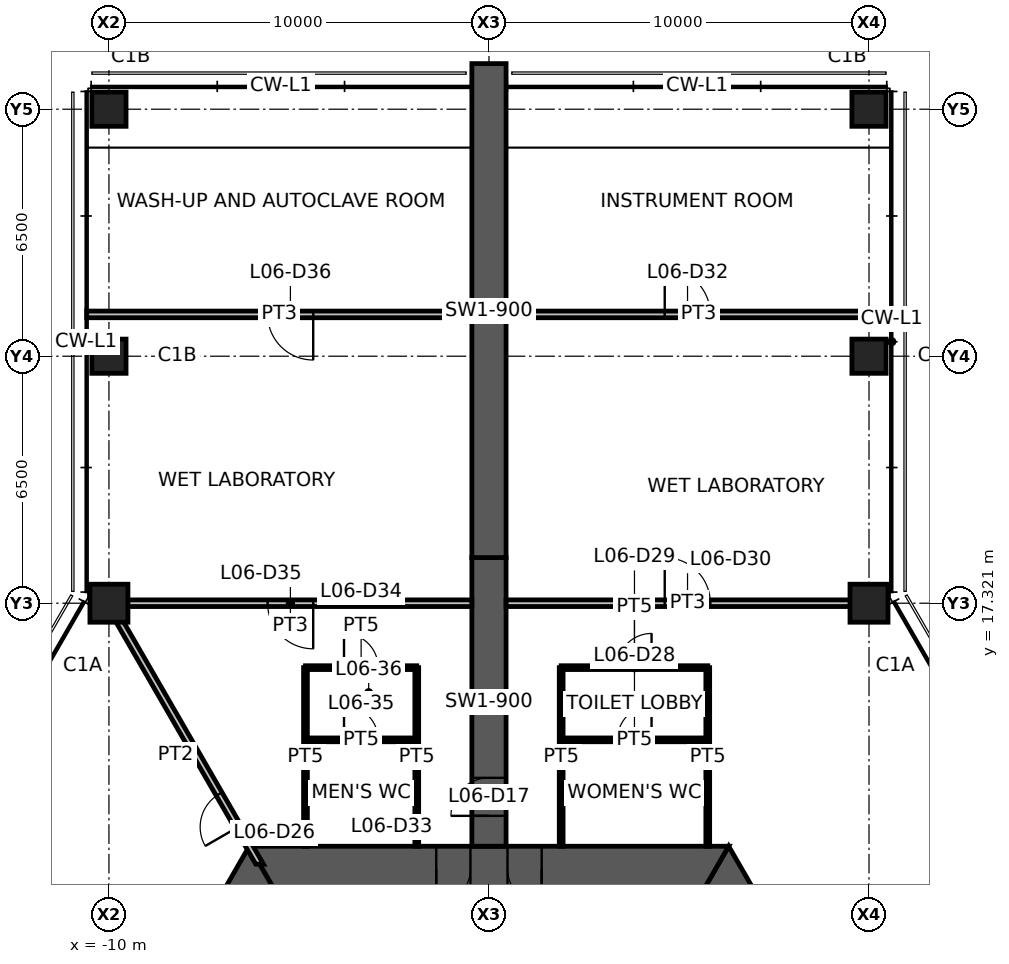
"""IFC4 building model, lengths in metres.
Left out: names, types, materials, properties, quantities, classifications, styles, units other than length and angle.
Written with IfcOpenShell. Run it as: python <this file> out.ifc"""

import sys

from ifc_helpers import new_model, si_unit, direction, frame, frame_2d, origin, origin_2d, place, context, subcontext, project, spatial, polyline, rectangle, hollow_rectangle, outline, extrude, element, fill, save


model = new_model("IFC4")
c1 = context("Model", 3, precision=1e-05, world=origin(), true_north=direction((0.0, 1.0)))
c2 = subcontext(c1, "Body", "Model", "MODEL_VIEW")
j1 = project(units=[si_unit("LENGTHUNIT", "METRE"), si_unit("PLANEANGLEUNIT", "RADIAN")], contexts=[c1])
p1 = place(None, origin())
s1 = spatial("IfcSite", under=j1, at=p1, CompositionType="ELEMENT")
p2 = place(p1, origin())
s2 = spatial("IfcBuilding", under=s1, at=p2, CompositionType="ELEMENT")
p3 = place(p2, frame((0.0, 0.0, 22.6)))
s3 = spatial("IfcBuildingStorey", under=s2, at=p3, CompositionType="ELEMENT", Elevation=22.6)
for number, where, z_axis, x_axis in (
    (1, (10.0, 17.321, 0.0), (0.0, 0.0, 1.0), (1.0, 0.0, 0.0)),
    (2, (-10.0, 17.321, 0.0), (0.0, 0.0, 1.0), (1.0, 0.0, 0.0)),
):
    element("IfcColumn", number, at=place(p3, frame(where, z_axis=z_axis, x_axis=x_axis)), inside=s3, PredefinedType="COLUMN", context=c2, shape_type="SweptSolid", body=[
        extrude(hollow_rectangle(XDim=1.0, YDim=1.0, WallThickness=0.06, at=origin_2d()), origin(), (0.0, 0.0, 1.0), 4.2),
    ])
for number, where, z_axis, x_axis in (
    (3, (10.0, 23.821, 0.0), (0.0, 0.0, 1.0), (1.0, 0.0, 0.0)),
    (4, (10.0, 30.321, 0.0), (0.0, 0.0, 1.0), (1.0, 0.0, 0.0)),
    (5, (-10.0, 23.821, 0.0), (0.0, 0.0, 1.0), (1.0, 0.0, 0.0)),
    (6, (-10.0, 30.321, 0.0), (0.0, 0.0, 1.0), (1.0, 0.0, 0.0)),
):
    element("IfcColumn", number, at=place(p3, frame(where, z_axis=z_axis, x_axis=x_axis)), inside=s3, PredefinedType="COLUMN", context=c2, shape_type="SweptSolid", body=[
        extrude(hollow_rectangle(XDim=0.9, YDim=0.9, WallThickness=0.05, at=origin_2d()), origin(), (0.0, 0.0, 1.0), 4.2),
    ])
p4 = place(p3, frame((11.922, 0.0, 0.0), z_axis=(0.0, 0.0, 1.0), x_axis=(-0.500004296715, 0.866022923061, 0.0)))
e7 = element("IfcWall", 7, at=p4, inside=s3, PredefinedType="SHEAR", context=c2, shape_type="SweptSolid", body=[
    extrude(outline(polyline([(-0.346, -0.6), (5.835, -0.6), (6.635, -0.6), (12.269, -0.6), (11.576, 0.6), (6.635, 0.6), (5.835, 0.6), (0.346, 0.6), (-0.346, -0.6)])), origin(), (0.0, 0.0, 1.0), 4.2),
])
p5 = place(p4, frame((5.835, 0.0, 0.0)))
e8 = element("IfcOpeningElement", 8, at=p5, cuts=e7, PredefinedType="OPENING", context=c2, shape_type="SweptSolid", body=[
    extrude(rectangle(XDim=0.8, YDim=2.1, at=frame_2d((0.4, 1.05))), frame((0.0, 0.61, 0.0), z_axis=(0.0, -1.0, 0.0), x_axis=(1.0, 0.0, 0.0)), (0.0, 0.0, 1.0), 1.22),
])
p6 = place(p3, frame((5.961, 10.325, 0.0), z_axis=(0.0, 0.0, 1.0), x_axis=(-1.0, 0.0, 0.0)))
e9 = element("IfcWall", 9, at=p6, inside=s3, PredefinedType="SHEAR", context=c2, shape_type="SweptSolid", body=[
    extrude(outline(polyline([(-0.346, -0.6), (4.574, -0.6), (5.474, -0.6), (6.449, -0.6), (7.349, -0.6), (12.269, -0.6), (11.576, 0.6), (7.349, 0.6), (6.449, 0.6), (5.474, 0.6), (4.574, 0.6), (0.346, 0.6), (-0.346, -0.6)])), origin(), (0.0, 0.0, 1.0), 4.2),
])
p7 = place(p6, frame((6.449, 0.0, 0.0)))
e10 = element("IfcOpeningElement", 10, at=p7, cuts=e9, PredefinedType="OPENING", context=c2, shape_type="SweptSolid", body=[
    extrude(rectangle(XDim=0.9, YDim=2.1, at=frame_2d((0.45, 1.05))), frame((0.0, 0.61, 0.0), z_axis=(0.0, -1.0, 0.0), x_axis=(1.0, 0.0, 0.0)), (0.0, 0.0, 1.0), 1.22),
])
p8 = place(p6, frame((4.574, 0.0, 0.0)))
e11 = element("IfcOpeningElement", 11, at=p8, cuts=e9, PredefinedType="OPENING", context=c2, shape_type="SweptSolid", body=[
    extrude(rectangle(XDim=0.9, YDim=2.1, at=frame_2d((0.45, 1.05))), frame((0.0, 0.61, 0.0), z_axis=(0.0, -1.0, 0.0), x_axis=(1.0, 0.0, 0.0)), (0.0, 0.0, 1.0), 1.22),
])
p9 = place(p3, frame((-5.961, 10.325, 0.0), z_axis=(0.0, 0.0, 1.0), x_axis=(-0.500004296715, -0.866022923061, 0.0)))
e12 = element("IfcWall", 12, at=p9, inside=s3, PredefinedType="SHEAR", context=c2, shape_type="SweptSolid", body=[
    extrude(outline(polyline([(-0.346, -0.6), (4.494, -0.6), (5.494, -0.6), (12.269, -0.6), (11.576, 0.6), (5.494, 0.6), (4.494, 0.6), (0.346, 0.6), (-0.346, -0.6)])), origin(), (0.0, 0.0, 1.0), 4.2),
])
p10 = place(p9, frame((4.494, 0.0, 0.0)))
e13 = element("IfcOpeningElement", 13, at=p10, cuts=e12, PredefinedType="OPENING", context=c2, shape_type="SweptSolid", body=[
    extrude(rectangle(XDim=1.0, YDim=2.1, at=frame_2d((0.5, 1.05))), frame((0.0, 0.61, 0.0), z_axis=(0.0, -1.0, 0.0), x_axis=(1.0, 0.0, 0.0)), (0.0, 0.0, 1.0), 1.22),
])
p11 = place(p3, frame((0.0, 10.925, 0.0), z_axis=(0.0, 0.0, 1.0), x_axis=(0.0, 1.0, 0.0)))
e14 = element("IfcWall", 14, at=p11, inside=s3, PredefinedType="SHEAR", context=c2, shape_type="SweptSolid", body=[
    extrude(rectangle(XDim=7.595, YDim=0.9, at=frame_2d((3.798, 0.0))), origin(), (0.0, 0.0, 1.0), 4.2),
])
p12 = place(p11, frame((0.8, 0.0, 0.0)))
e15 = element("IfcOpeningElement", 15, at=p12, cuts=e14, PredefinedType="OPENING", context=c2, shape_type="SweptSolid", body=[
    extrude(rectangle(XDim=1.0, YDim=2.1, at=frame_2d((0.5, 1.05))), frame((0.0, 0.46, 0.0), z_axis=(0.0, -1.0, 0.0), x_axis=(1.0, 0.0, 0.0)), (0.0, 0.0, 1.0), 0.92),
])
p13 = place(p3, frame((0.0, 18.521, 0.0), z_axis=(0.0, 0.0, 1.0), x_axis=(0.0, 1.0, 0.0)))
e16 = element("IfcWall", 16, at=p13, inside=s3, PredefinedType="SHEAR", context=c2, shape_type="SweptSolid", body=[
    extrude(rectangle(XDim=13.0, YDim=0.9, at=frame_2d((6.5, 0.0))), origin(), (0.0, 0.0, 1.0), 4.2),
])
p14 = place(p3, frame((-6.035, 10.453, 0.0), z_axis=(0.0, 0.0, 1.0), x_axis=(-0.499993402427, 0.866029212861, 0.0)))
e17 = element("IfcWall", 17, at=p14, inside=s3, PredefinedType="PARTITIONING", context=c2, shape_type="SweptSolid", body=[
    extrude(outline(polyline([(-0.051, -0.087), (1.129, -0.087), (2.129, -0.087), (7.93, -0.087), (7.93, 0.087), (2.129, 0.087), (1.129, 0.087), (0.051, 0.087), (-0.051, -0.087)])), origin(), (0.0, 0.0, 1.0), 3.3),
])
p15 = place(p14, frame((1.129, 0.0, 0.0)))
e18 = element("IfcOpeningElement", 18, at=p15, cuts=e17, PredefinedType="OPENING", context=c2, shape_type="SweptSolid", body=[
    extrude(rectangle(XDim=1.0, YDim=2.1, at=frame_2d((0.5, 1.05))), frame((0.0, 0.098, 0.0), z_axis=(0.0, -1.0, 0.0), x_axis=(1.0, 0.0, 0.0)), (0.0, 0.0, 1.0), 0.195),
])
p16 = place(p3, frame((1.9, 13.725, 0.0), z_axis=(0.0, 0.0, 1.0), x_axis=(1.0, 0.0, 0.0)))
e19 = element("IfcWall", 19, at=p16, inside=s3, PredefinedType="PARTITIONING", context=c2, shape_type="SweptSolid", body=[
    extrude(rectangle(XDim=3.857, YDim=0.1, at=frame_2d((1.929, 0.0))), origin(), (0.0, 0.0, 1.0), 3.2),
])
p17 = place(p16, frame((1.479, 0.0, 0.0)))
e20 = element("IfcOpeningElement", 20, at=p17, cuts=e19, PredefinedType="OPENING", context=c2, shape_type="SweptSolid", body=[
    extrude(rectangle(XDim=0.9, YDim=2.1, at=frame_2d((0.45, 1.05))), frame((0.0, 0.06, 0.0), z_axis=(0.0, -1.0, 0.0), x_axis=(1.0, 0.0, 0.0)), (0.0, 0.0, 1.0), 0.12),
])
p18 = place(p3, frame((1.9, 15.625, 0.0), z_axis=(0.0, 0.0, 1.0), x_axis=(1.0, 0.0, 0.0)))
e21 = element("IfcWall", 21, at=p18, inside=s3, PredefinedType="PARTITIONING", context=c2, shape_type="SweptSolid", body=[
    extrude(rectangle(XDim=3.857, YDim=0.1, at=frame_2d((1.929, 0.0))), origin(), (0.0, 0.0, 1.0), 3.2),
])
p19 = place(p18, frame((1.479, 0.0, 0.0)))
e22 = element("IfcOpeningElement", 22, at=p19, cuts=e21, PredefinedType="OPENING", context=c2, shape_type="SweptSolid", body=[
    extrude(rectangle(XDim=0.9, YDim=2.1, at=frame_2d((0.45, 1.05))), frame((0.0, 0.06, 0.0), z_axis=(0.0, -1.0, 0.0), x_axis=(1.0, 0.0, 0.0)), (0.0, 0.0, 1.0), 0.12),
])
for number, where, z_axis, x_axis in (
    (23, (1.9, 10.925, 0.0), (0.0, 0.0, 1.0), (0.0, 1.0, 0.0)),
    (24, (5.757, 10.925, 0.0), (0.0, 0.0, 1.0), (0.0, 1.0, 0.0)),
):
    element("IfcWall", number, at=place(p3, frame(where, z_axis=z_axis, x_axis=x_axis)), inside=s3, PredefinedType="PARTITIONING", context=c2, shape_type="SweptSolid", body=[
        extrude(rectangle(XDim=4.7, YDim=0.1, at=frame_2d((2.35, 0.0))), origin(), (0.0, 0.0, 1.0), 3.2),
    ])
p20 = place(p3, frame((0.45, 17.321, 0.0), z_axis=(0.0, 0.0, 1.0), x_axis=(1.0, 0.0, 0.0)))
e25 = element("IfcWall", 25, at=p20, inside=s3, PredefinedType="PARTITIONING", context=c2, shape_type="SweptSolid", body=[
    extrude(rectangle(XDim=9.55, YDim=0.175, at=frame_2d((4.775, 0.0))), origin(), (0.0, 0.0, 1.0), 3.208),
])
p21 = place(p20, frame((4.175, 0.0, 0.0)))
e26 = element("IfcOpeningElement", 26, at=p21, cuts=e25, PredefinedType="OPENING", context=c2, shape_type="SweptSolid", body=[
    extrude(rectangle(XDim=1.2, YDim=2.1, at=frame_2d((0.6, 1.05))), frame((0.0, 0.098, 0.0), z_axis=(0.0, -1.0, 0.0), x_axis=(1.0, 0.0, 0.0)), (0.0, 0.0, 1.0), 0.195),
])
p22 = place(p3, frame((0.45, 24.92, 0.0), z_axis=(0.0, 0.0, 1.0), x_axis=(1.0, 0.0, 0.0)))
e27 = element("IfcWall", 27, at=p22, inside=s3, PredefinedType="PARTITIONING", context=c2, shape_type="SweptSolid", body=[
    extrude(rectangle(XDim=10.135, YDim=0.175, at=frame_2d((5.067, 0.0))), origin(), (0.0, 0.0, 1.0), 4.0),
])
p23 = place(p22, frame((4.175, 0.0, 0.0)))
e28 = element("IfcOpeningElement", 28, at=p23, cuts=e27, PredefinedType="OPENING", context=c2, shape_type="SweptSolid", body=[
    extrude(rectangle(XDim=1.2, YDim=2.1, at=frame_2d((0.6, 1.05))), frame((0.0, 0.098, 0.0), z_axis=(0.0, -1.0, 0.0), x_axis=(1.0, 0.0, 0.0)), (0.0, 0.0, 1.0), 0.195),
])
p24 = place(p3, frame((-4.829, 13.725, 0.0), z_axis=(0.0, 0.0, 1.0), x_axis=(1.0, 0.0, 0.0)))
e29 = element("IfcWall", 29, at=p24, inside=s3, PredefinedType="PARTITIONING", context=c2, shape_type="SweptSolid", body=[
    extrude(rectangle(XDim=2.929, YDim=0.1, at=frame_2d((1.464, 0.0))), origin(), (0.0, 0.0, 1.0), 3.2),
])
p25 = place(p24, frame((1.014, 0.0, 0.0)))
e30 = element("IfcOpeningElement", 30, at=p25, cuts=e29, PredefinedType="OPENING", context=c2, shape_type="SweptSolid", body=[
    extrude(rectangle(XDim=0.9, YDim=2.1, at=frame_2d((0.45, 1.05))), frame((0.0, 0.06, 0.0), z_axis=(0.0, -1.0, 0.0), x_axis=(1.0, 0.0, 0.0)), (0.0, 0.0, 1.0), 0.12),
])
p26 = place(p3, frame((-4.829, 15.625, 0.0), z_axis=(0.0, 0.0, 1.0), x_axis=(1.0, 0.0, 0.0)))
e31 = element("IfcWall", 31, at=p26, inside=s3, PredefinedType="PARTITIONING", context=c2, shape_type="SweptSolid", body=[
    extrude(rectangle(XDim=2.929, YDim=0.1, at=frame_2d((1.464, 0.0))), origin(), (0.0, 0.0, 1.0), 3.2),
])
p27 = place(p26, frame((1.014, 0.0, 0.0)))
e32 = element("IfcOpeningElement", 32, at=p27, cuts=e31, PredefinedType="OPENING", context=c2, shape_type="SweptSolid", body=[
    extrude(rectangle(XDim=0.9, YDim=2.1, at=frame_2d((0.45, 1.05))), frame((0.0, 0.06, 0.0), z_axis=(0.0, -1.0, 0.0), x_axis=(1.0, 0.0, 0.0)), (0.0, 0.0, 1.0), 0.12),
])
for number, where, z_axis, x_axis in (
    (33, (-1.9, 10.925, 0.0), (0.0, 0.0, 1.0), (0.0, 1.0, 0.0)),
    (34, (-4.829, 10.925, 0.0), (0.0, 0.0, 1.0), (0.0, 1.0, 0.0)),
):
    element("IfcWall", number, at=place(p3, frame(where, z_axis=z_axis, x_axis=x_axis)), inside=s3, PredefinedType="PARTITIONING", context=c2, shape_type="SweptSolid", body=[
        extrude(rectangle(XDim=4.7, YDim=0.1, at=frame_2d((2.35, 0.0))), origin(), (0.0, 0.0, 1.0), 3.2),
    ])
p28 = place(p3, frame((-0.45, 17.321, 0.0), z_axis=(0.0, 0.0, 1.0), x_axis=(-1.0, 0.0, 0.0)))
e35 = element("IfcWall", 35, at=p28, inside=s3, PredefinedType="PARTITIONING", context=c2, shape_type="SweptSolid", body=[
    extrude(rectangle(XDim=9.55, YDim=0.175, at=frame_2d((4.775, 0.0))), origin(), (0.0, 0.0, 1.0), 3.208),
])
p29 = place(p28, frame((4.175, 0.0, 0.0)))
e36 = element("IfcOpeningElement", 36, at=p29, cuts=e35, PredefinedType="OPENING", context=c2, shape_type="SweptSolid", body=[
    extrude(rectangle(XDim=1.2, YDim=2.1, at=frame_2d((0.6, 1.05))), frame((0.0, 0.098, 0.0), z_axis=(0.0, -1.0, 0.0), x_axis=(1.0, 0.0, 0.0)), (0.0, 0.0, 1.0), 0.195),
])
p30 = place(p3, frame((-0.45, 24.92, 0.0), z_axis=(0.0, 0.0, 1.0), x_axis=(-1.0, 0.0, 0.0)))
e37 = element("IfcWall", 37, at=p30, inside=s3, PredefinedType="PARTITIONING", context=c2, shape_type="SweptSolid", body=[
    extrude(rectangle(XDim=10.135, YDim=0.175, at=frame_2d((5.067, 0.0))), origin(), (0.0, 0.0, 1.0), 4.0),
])
p31 = place(p30, frame((4.175, 0.0, 0.0)))
e38 = element("IfcOpeningElement", 38, at=p31, cuts=e37, PredefinedType="OPENING", context=c2, shape_type="SweptSolid", body=[
    extrude(rectangle(XDim=1.2, YDim=2.1, at=frame_2d((0.6, 1.05))), frame((0.0, 0.098, 0.0), z_axis=(0.0, -1.0, 0.0), x_axis=(1.0, 0.0, 0.0)), (0.0, 0.0, 1.0), 0.195),
])
p32 = place(p7, origin())
e39 = element("IfcDoor", 39, at=p32, inside=s3, OperationType="SINGLE_SWING_RIGHT", PredefinedType="DOOR", context=c2, shape_type="SweptSolid", body=[
    extrude(rectangle(XDim=0.9, YDim=2.1, at=frame_2d((0.45, 1.05))), frame((0.0, 0.025, 0.0), z_axis=(0.0, -1.0, 0.0), x_axis=(1.0, 0.0, 0.0)), (0.0, 0.0, 1.0), 0.05),
])
fill(e10, e39)
p33 = place(p8, origin())
e40 = element("IfcDoor", 40, at=p33, inside=s3, OperationType="SINGLE_SWING_LEFT", PredefinedType="DOOR", context=c2, shape_type="SweptSolid", body=[
    extrude(rectangle(XDim=0.9, YDim=2.1, at=frame_2d((0.45, 1.05))), frame((0.0, 0.025, 0.0), z_axis=(0.0, -1.0, 0.0), x_axis=(1.0, 0.0, 0.0)), (0.0, 0.0, 1.0), 0.05),
])
fill(e11, e40)
p34 = place(p12, origin())
e41 = element("IfcDoor", 41, at=p34, inside=s3, OperationType="SINGLE_SWING_LEFT", PredefinedType="DOOR", context=c2, shape_type="SweptSolid", body=[
    extrude(rectangle(XDim=1.0, YDim=2.1, at=frame_2d((0.5, 1.05))), frame((0.0, 0.025, 0.0), z_axis=(0.0, -1.0, 0.0), x_axis=(1.0, 0.0, 0.0)), (0.0, 0.0, 1.0), 0.05),
])
fill(e15, e41)
p35 = place(p15, origin())
e42 = element("IfcDoor", 42, at=p35, inside=s3, OperationType="SINGLE_SWING_LEFT", PredefinedType="DOOR", context=c2, shape_type="SweptSolid", body=[
    extrude(rectangle(XDim=1.0, YDim=2.1, at=frame_2d((0.5, 1.05))), frame((0.0, 0.025, 0.0), z_axis=(0.0, -1.0, 0.0), x_axis=(1.0, 0.0, 0.0)), (0.0, 0.0, 1.0), 0.05),
])
fill(e18, e42)
p36 = place(p17, origin())
e43 = element("IfcDoor", 43, at=p36, inside=s3, OperationType="SINGLE_SWING_RIGHT", PredefinedType="DOOR", context=c2, shape_type="SweptSolid", body=[
    extrude(rectangle(XDim=0.9, YDim=2.1, at=frame_2d((0.45, 1.05))), frame((0.0, 0.025, 0.0), z_axis=(0.0, -1.0, 0.0), x_axis=(1.0, 0.0, 0.0)), (0.0, 0.0, 1.0), 0.05),
])
fill(e20, e43)
p37 = place(p19, origin())
e44 = element("IfcDoor", 44, at=p37, inside=s3, OperationType="SINGLE_SWING_RIGHT", PredefinedType="DOOR", context=c2, shape_type="SweptSolid", body=[
    extrude(rectangle(XDim=0.9, YDim=2.1, at=frame_2d((0.45, 1.05))), frame((0.0, 0.025, 0.0), z_axis=(0.0, -1.0, 0.0), x_axis=(1.0, 0.0, 0.0)), (0.0, 0.0, 1.0), 0.05),
])
fill(e22, e44)
p38 = place(p21, origin())
e45 = element("IfcDoor", 45, at=p38, inside=s3, OperationType="DOUBLE_DOOR_SINGLE_SWING", PredefinedType="DOOR", context=c2, shape_type="SweptSolid", body=[
    extrude(rectangle(XDim=1.2, YDim=2.1, at=frame_2d((0.6, 1.05))), frame((0.0, 0.025, 0.0), z_axis=(0.0, -1.0, 0.0), x_axis=(1.0, 0.0, 0.0)), (0.0, 0.0, 1.0), 0.05),
])
fill(e26, e45)
p39 = place(p23, origin())
e46 = element("IfcDoor", 46, at=p39, inside=s3, OperationType="DOUBLE_DOOR_SINGLE_SWING", PredefinedType="DOOR", context=c2, shape_type="SweptSolid", body=[
    extrude(rectangle(XDim=1.2, YDim=2.1, at=frame_2d((0.6, 1.05))), frame((0.0, 0.025, 0.0), z_axis=(0.0, -1.0, 0.0), x_axis=(1.0, 0.0, 0.0)), (0.0, 0.0, 1.0), 0.05),
])
fill(e28, e46)
p40 = place(p25, origin())
e47 = element("IfcDoor", 47, at=p40, inside=s3, OperationType="SINGLE_SWING_LEFT", PredefinedType="DOOR", context=c2, shape_type="SweptSolid", body=[
    extrude(rectangle(XDim=0.9, YDim=2.1, at=frame_2d((0.45, 1.05))), frame((0.0, 0.025, 0.0), z_axis=(0.0, -1.0, 0.0), x_axis=(1.0, 0.0, 0.0)), (0.0, 0.0, 1.0), 0.05),
])
fill(e30, e47)
p41 = place(p27, origin())
e48 = element("IfcDoor", 48, at=p41, inside=s3, OperationType="SINGLE_SWING_LEFT", PredefinedType="DOOR", context=c2, shape_type="SweptSolid", body=[
    extrude(rectangle(XDim=0.9, YDim=2.1, at=frame_2d((0.45, 1.05))), frame((0.0, 0.025, 0.0), z_axis=(0.0, -1.0, 0.0), x_axis=(1.0, 0.0, 0.0)), (0.0, 0.0, 1.0), 0.05),
])
fill(e32, e48)
p42 = place(p29, origin())
e49 = element("IfcDoor", 49, at=p42, inside=s3, OperationType="DOUBLE_DOOR_SINGLE_SWING", PredefinedType="DOOR", context=c2, shape_type="SweptSolid", body=[
    extrude(rectangle(XDim=1.2, YDim=2.1, at=frame_2d((0.6, 1.05))), frame((0.0, 0.025, 0.0), z_axis=(0.0, -1.0, 0.0), x_axis=(1.0, 0.0, 0.0)), (0.0, 0.0, 1.0), 0.05),
])
fill(e36, e49)
p43 = place(p31, origin())
e50 = element("IfcDoor", 50, at=p43, inside=s3, OperationType="DOUBLE_DOOR_SINGLE_SWING", PredefinedType="DOOR", context=c2, shape_type="SweptSolid", body=[
    extrude(rectangle(XDim=1.2, YDim=2.1, at=frame_2d((0.6, 1.05))), frame((0.0, 0.025, 0.0), z_axis=(0.0, -1.0, 0.0), x_axis=(1.0, 0.0, 0.0)), (0.0, 0.0, 1.0), 0.05),
])
fill(e38, e50)
save(model, sys.argv[1])
